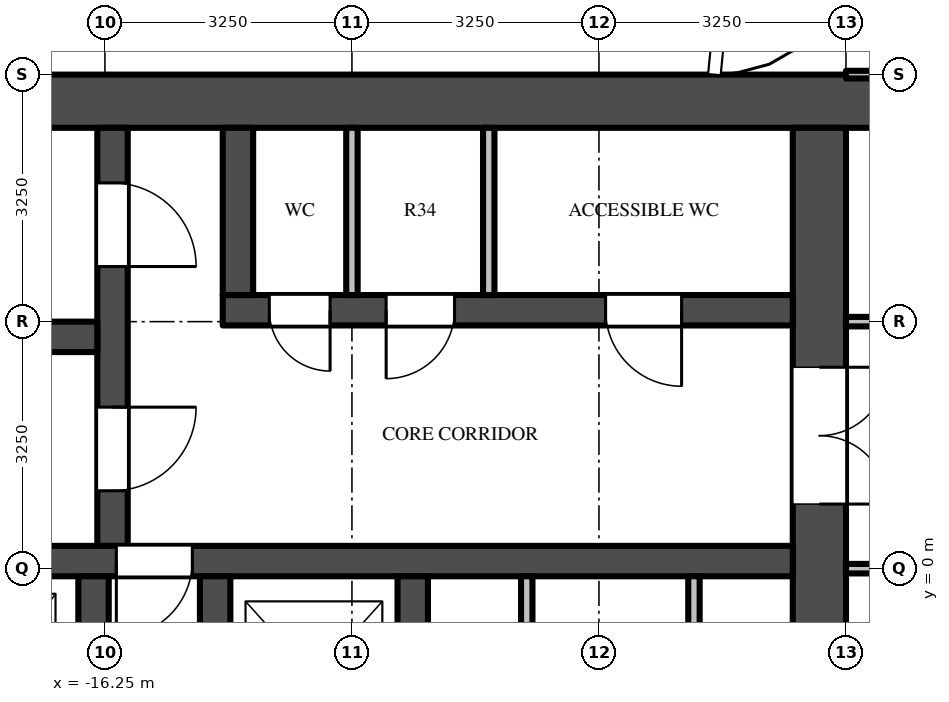
"""IFC4 building model, lengths in metres.
Left out: names, types, materials, properties, quantities, classifications, styles, units other than length and angle.
Written with IfcOpenShell. Run it as: python <this file> out.ifc"""

import sys

from ifc_helpers import new_model, si_unit, direction, frame, frame_2d, origin, place, context, subcontext, project, spatial, rectangle, extrude, source, transform, mapped, element, fill, save


model = new_model("IFC4")
c1 = context("Model", 3, precision=1e-05, world=origin(), true_north=direction((0.0, 1.0)))
c2 = subcontext(c1, "Body", "Model", "MODEL_VIEW")
j1 = project(units=[si_unit("LENGTHUNIT", "METRE"), si_unit("PLANEANGLEUNIT", "RADIAN")], contexts=[c1])
p1 = place(None, origin())
s1 = spatial("IfcSite", under=j1, at=p1, CompositionType="ELEMENT")
p2 = place(p1, origin())
s2 = spatial("IfcBuilding", under=s1, at=p2, CompositionType="ELEMENT")
p3 = place(p2, frame((0.0, 0.0, 298.9)))
s3 = spatial("IfcBuildingStorey", under=s2, at=p3, CompositionType="ELEMENT", Elevation=298.9)
m1 = source(origin(), c2, "Body", "SweptSolid", [
    extrude(rectangle(XDim=16.65, YDim=0.7, at=frame_2d((8.325, 0.0))), origin(), (0.0, 0.0, 1.0), 3.7),
])
p4 = place(p3, frame((-6.1, 6.15, 0.0), z_axis=(0.0, 0.0, 1.0), x_axis=(-1.0, 0.0, 0.0)))
e1 = element("IfcWall", 1, at=p4, inside=s3, PredefinedType="SHEAR", context=c2, shape_type="MappedRepresentation", body=[
    mapped(m1, transform((0.0, 0.0, 0.0))),
])
m2 = source(origin(), c2, "Body", "SweptSolid", [
    extrude(rectangle(XDim=9.05, YDim=0.7, at=frame_2d((4.525, 0.0))), origin(), (0.0, 0.0, 1.0), 3.7),
])
p5 = place(p3, frame((-6.85, 5.8, 0.0), z_axis=(0.0, 0.0, 1.0), x_axis=(0.0, -1.0, 0.0)))
e2 = element("IfcWall", 2, at=p5, inside=s3, PredefinedType="SHEAR", context=c2, shape_type="MappedRepresentation", body=[
    mapped(m2, transform((0.0, 0.0, 0.0))),
])
m3 = source(origin(), c2, "Body", "SweptSolid", [
    extrude(rectangle(XDim=1.8, YDim=2.1, at=frame_2d((0.9, 1.05))), frame((0.0, 0.36, 0.0), z_axis=(0.0, -1.0, 0.0), x_axis=(1.0, 0.0, 0.0)), (0.0, 0.0, 1.0), 0.72),
])
p6 = place(p5, frame((3.15, 0.0, 0.0)))
e3 = element("IfcOpeningElement", 3, at=p6, cuts=e2, PredefinedType="OPENING", context=c2, shape_type="MappedRepresentation", body=[
    mapped(m3, transform((0.0, 0.0, 0.0))),
])
m4 = source(origin(), c2, "Body", "SweptSolid", [
    extrude(rectangle(XDim=7.5, YDim=0.4, at=frame_2d((3.75, 0.0))), origin(), (0.0, 0.0, 1.0), 3.7),
])
p7 = place(p3, frame((-7.2, 3.4, 0.0), z_axis=(0.0, 0.0, 1.0), x_axis=(-1.0, 0.0, 0.0)))
e4 = element("IfcWall", 4, at=p7, inside=s3, PredefinedType="SHEAR", context=c2, shape_type="MappedRepresentation", body=[
    mapped(m4, transform((0.0, 0.0, 0.0))),
])
m5 = source(origin(), c2, "Body", "SweptSolid", [
    extrude(rectangle(XDim=1.0, YDim=2.1, at=frame_2d((0.5, 1.05))), frame((0.0, 0.21, 0.0), z_axis=(0.0, -1.0, 0.0), x_axis=(1.0, 0.0, 0.0)), (0.0, 0.0, 1.0), 0.42),
])
p8 = place(p7, frame((1.462, 0.0, 0.0)))
e5 = element("IfcOpeningElement", 5, at=p8, cuts=e4, PredefinedType="OPENING", context=c2, shape_type="MappedRepresentation", body=[
    mapped(m5, transform((0.0, 0.0, 0.0))),
])
m6 = source(origin(), c2, "Body", "SweptSolid", [
    extrude(rectangle(XDim=0.9, YDim=2.1, at=frame_2d((0.45, 1.05))), frame((0.0, 0.21, 0.0), z_axis=(0.0, -1.0, 0.0), x_axis=(1.0, 0.0, 0.0)), (0.0, 0.0, 1.0), 0.42),
])
p9 = place(p7, frame((4.45, 0.0, 0.0)))
e6 = element("IfcOpeningElement", 6, at=p9, cuts=e4, PredefinedType="OPENING", context=c2, shape_type="MappedRepresentation", body=[
    mapped(m6, transform((0.0, 0.0, 0.0))),
])
m7 = source(origin(), c2, "Body", "SweptSolid", [
    extrude(rectangle(XDim=0.8, YDim=2.1, at=frame_2d((0.4, 1.05))), frame((0.0, 0.21, 0.0), z_axis=(0.0, -1.0, 0.0), x_axis=(1.0, 0.0, 0.0)), (0.0, 0.0, 1.0), 0.42),
])
p10 = place(p7, frame((6.087, 0.0, 0.0)))
e7 = element("IfcOpeningElement", 7, at=p10, cuts=e4, PredefinedType="OPENING", context=c2, shape_type="MappedRepresentation", body=[
    mapped(m7, transform((0.0, 0.0, 0.0))),
])
m8 = source(origin(), c2, "Body", "SweptSolid", [
    extrude(rectangle(XDim=14.85, YDim=0.4, at=frame_2d((7.425, 0.0))), origin(), (0.0, 0.0, 1.0), 3.7),
])
p11 = place(p3, frame((-7.2, 0.1, 0.0), z_axis=(0.0, 0.0, 1.0), x_axis=(-1.0, 0.0, 0.0)))
e8 = element("IfcWall", 8, at=p11, inside=s3, PredefinedType="SHEAR", context=c2, shape_type="MappedRepresentation", body=[
    mapped(m8, transform((0.0, 0.0, 0.0))),
])
p12 = place(p11, frame((7.9, 0.0, 0.0)))
e9 = element("IfcOpeningElement", 9, at=p12, cuts=e8, PredefinedType="OPENING", context=c2, shape_type="MappedRepresentation", body=[
    mapped(m5, transform((0.0, 0.0, 0.0))),
])
m9 = source(origin(), c2, "Body", "SweptSolid", [
    extrude(rectangle(XDim=5.5, YDim=0.4, at=frame_2d((2.75, 0.0))), origin(), (0.0, 0.0, 1.0), 3.7),
])
p13 = place(p3, frame((-16.15, 5.8, 0.0), z_axis=(0.0, 0.0, 1.0), x_axis=(0.0, -1.0, 0.0)))
e10 = element("IfcWall", 10, at=p13, inside=s3, PredefinedType="SHEAR", context=c2, shape_type="MappedRepresentation", body=[
    mapped(m9, transform((0.0, 0.0, 0.0))),
])
m10 = source(origin(), c2, "Body", "SweptSolid", [
    extrude(rectangle(XDim=1.1, YDim=2.1, at=frame_2d((0.55, 1.05))), frame((0.0, 0.21, 0.0), z_axis=(0.0, -1.0, 0.0), x_axis=(1.0, 0.0, 0.0)), (0.0, 0.0, 1.0), 0.42),
])
p14 = place(p13, frame((0.725, 0.0, 0.0)))
e11 = element("IfcOpeningElement", 11, at=p14, cuts=e10, PredefinedType="OPENING", context=c2, shape_type="MappedRepresentation", body=[
    mapped(m10, transform((0.0, 0.0, 0.0))),
])
p15 = place(p13, frame((3.675, 0.0, 0.0)))
e12 = element("IfcOpeningElement", 12, at=p15, cuts=e10, PredefinedType="OPENING", context=c2, shape_type="MappedRepresentation", body=[
    mapped(m10, transform((0.0, 0.0, 0.0))),
])
m11 = source(origin(), c2, "Body", "SweptSolid", [
    extrude(rectangle(XDim=5.7, YDim=0.4, at=frame_2d((2.85, 0.0))), origin(), (0.0, 0.0, 1.0), 3.7),
])
p16 = place(p3, frame((-16.35, 3.05, 0.0), z_axis=(0.0, 0.0, 1.0), x_axis=(-1.0, 0.0, 0.0)))
e13 = element("IfcWall", 13, at=p16, inside=s3, PredefinedType="SHEAR", context=c2, shape_type="MappedRepresentation", body=[
    mapped(m11, transform((0.0, 0.0, 0.0))),
])
m12 = source(origin(), c2, "Body", "SweptSolid", [
    extrude(rectangle(XDim=2.2, YDim=0.4, at=frame_2d((1.1, 0.0))), origin(), (0.0, 0.0, 1.0), 3.7),
])
p17 = place(p3, frame((-14.5, 5.8, 0.0), z_axis=(0.0, 0.0, 1.0), x_axis=(0.0, -1.0, 0.0)))
e14 = element("IfcWall", 14, at=p17, inside=s3, PredefinedType="SHEAR", context=c2, shape_type="MappedRepresentation", body=[
    mapped(m12, transform((0.0, 0.0, 0.0))),
])
m13 = source(origin(), c2, "Body", "SweptSolid", [
    extrude(rectangle(XDim=2.45, YDim=0.4, at=frame_2d((1.225, 0.0))), origin(), (0.0, 0.0, 1.0), 3.7),
])
for number, where, z_axis, x_axis in (
    (15, (-12.2, -0.1, 0.0), (0.0, 0.0, 1.0), (0.0, -1.0, 0.0)),
    (16, (-14.8, -0.1, 0.0), (0.0, 0.0, 1.0), (0.0, -1.0, 0.0)),
    (17, (-16.4, -0.1, 0.0), (0.0, 0.0, 1.0), (0.0, -1.0, 0.0)),
):
    element("IfcWall", number, at=place(p3, frame(where, z_axis=z_axis, x_axis=x_axis)), inside=s3, PredefinedType="SHEAR", context=c2, shape_type="MappedRepresentation", body=[
        mapped(m13, transform((0.0, 0.0, 0.0))),
    ])
m14 = source(origin(), c2, "Body", "SweptSolid", [
    extrude(rectangle(XDim=2.2, YDim=0.15, at=frame_2d((1.1, 0.0))), origin(), (0.0, 0.0, 1.0), 3.7),
])
for number, where, z_axis, x_axis in (
    (18, (-11.2, 5.8, 0.0), (0.0, 0.0, 1.0), (0.0, -1.0, 0.0)),
    (19, (-13.0, 5.8, 0.0), (0.0, 0.0, 1.0), (0.0, -1.0, 0.0)),
):
    element("IfcWall", number, at=place(p3, frame(where, z_axis=z_axis, x_axis=x_axis)), inside=s3, PredefinedType="PARTITIONING", context=c2, shape_type="MappedRepresentation", body=[
        mapped(m14, transform((0.0, 0.0, 0.0))),
    ])
m15 = source(origin(), c2, "Body", "SweptSolid", [
    extrude(rectangle(XDim=2.45, YDim=0.15, at=frame_2d((1.225, 0.0))), origin(), (0.0, 0.0, 1.0), 3.7),
])
for number, where, z_axis, x_axis in (
    (20, (-8.5, -0.1, 0.0), (0.0, 0.0, 1.0), (0.0, -1.0, 0.0)),
    (21, (-10.7, -0.1, 0.0), (0.0, 0.0, 1.0), (0.0, -1.0, 0.0)),
):
    element("IfcWall", number, at=place(p3, frame(where, z_axis=z_axis, x_axis=x_axis)), inside=s3, PredefinedType="PARTITIONING", context=c2, shape_type="MappedRepresentation", body=[
        mapped(m15, transform((0.0, 0.0, 0.0))),
    ])
m16 = source(origin(), c2, "Body", "SweptSolid", [
    extrude(rectangle(XDim=5.363, YDim=0.125, at=frame_2d((2.681, 0.0))), origin(), (0.0, 0.0, 1.0), 2.997),
])
p18 = place(p3, frame((-1.137, 0.0, 0.0), z_axis=(0.0, 0.0, 1.0), x_axis=(-1.0, 0.0, 0.0)))
e22 = element("IfcWall", 22, at=p18, inside=s3, PredefinedType="PARTITIONING", context=c2, shape_type="MappedRepresentation", body=[
    mapped(m16, transform((0.0, 0.0, 0.0))),
])
m17 = source(origin(), c2, "Body", "SweptSolid", [
    extrude(rectangle(XDim=1.0, YDim=2.1, at=frame_2d((0.5, 1.05))), frame((0.0, 0.073, 0.0), z_axis=(0.0, -1.0, 0.0), x_axis=(1.0, 0.0, 0.0)), (0.0, 0.0, 1.0), 0.145),
])
p19 = place(p18, frame((4.012, 0.0, 0.0)))
e23 = element("IfcOpeningElement", 23, at=p19, cuts=e22, PredefinedType="OPENING", context=c2, shape_type="MappedRepresentation", body=[
    mapped(m17, transform((0.0, 0.0, 0.0))),
])
p20 = place(p3, frame((-6.5, 3.25, 0.0), z_axis=(0.0, 0.0, 1.0), x_axis=(1.0, 0.0, 0.0)))
e24 = element("IfcWall", 24, at=p20, inside=s3, PredefinedType="PARTITIONING", context=c2, shape_type="MappedRepresentation", body=[
    mapped(m16, transform((0.0, 0.0, 0.0))),
])
p21 = place(p20, frame((1.3, 0.0, 0.0)))
e25 = element("IfcOpeningElement", 25, at=p21, cuts=e24, PredefinedType="OPENING", context=c2, shape_type="MappedRepresentation", body=[
    mapped(m17, transform((0.0, 0.0, 0.0))),
])
m18 = source(origin(), c2, "Body", "SweptSolid", [
    extrude(rectangle(XDim=5.238, YDim=0.1, at=frame_2d((2.619, 0.0))), origin(), (0.0, 0.0, 1.0), 2.78),
])
p22 = place(p3, frame((-6.5, 6.5, 0.0), z_axis=(0.0, 0.0, 1.0), x_axis=(1.0, 0.0, 0.0)))
e26 = element("IfcWall", 26, at=p22, inside=s3, PredefinedType="PARTITIONING", context=c2, shape_type="MappedRepresentation", body=[
    mapped(m18, transform((0.0, 0.0, 0.0))),
])
m19 = source(origin(), c2, "Body", "SweptSolid", [
    extrude(rectangle(XDim=1.8, YDim=2.1, at=frame_2d((0.9, 1.05))), frame((0.0, -0.275, 0.0), z_axis=(0.0, -1.0, 0.0), x_axis=(1.0, 0.0, 0.0)), (0.0, 0.0, 1.0), 0.05),
])
p23 = place(p6, origin())
e27 = element("IfcDoor", 27, at=p23, inside=s3, OperationType="DOUBLE_DOOR_SINGLE_SWING", PredefinedType="DOOR", context=c2, shape_type="MappedRepresentation", body=[
    mapped(m19, transform((0.0, 0.0, 0.0))),
])
fill(e3, e27)
m20 = source(origin(), c2, "Body", "SweptSolid", [
    extrude(rectangle(XDim=1.1, YDim=2.1, at=frame_2d((0.55, 1.05))), frame((0.0, 0.025, 0.0), z_axis=(0.0, -1.0, 0.0), x_axis=(1.0, 0.0, 0.0)), (0.0, 0.0, 1.0), 0.05),
])
p24 = place(p14, origin())
e28 = element("IfcDoor", 28, at=p24, inside=s3, OperationType="SINGLE_SWING_RIGHT", PredefinedType="DOOR", context=c2, shape_type="MappedRepresentation", body=[
    mapped(m20, transform((0.0, 0.0, 0.0))),
])
fill(e11, e28)
p25 = place(p15, origin())
e29 = element("IfcDoor", 29, at=p25, inside=s3, OperationType="SINGLE_SWING_LEFT", PredefinedType="DOOR", context=c2, shape_type="MappedRepresentation", body=[
    mapped(m20, transform((0.0, 0.0, 0.0))),
])
fill(e12, e29)
m21 = source(origin(), c2, "Body", "SweptSolid", [
    extrude(rectangle(XDim=1.0, YDim=2.1, at=frame_2d((0.5, 1.05))), frame((0.0, 0.025, 0.0), z_axis=(0.0, -1.0, 0.0), x_axis=(1.0, 0.0, 0.0)), (0.0, 0.0, 1.0), 0.05),
])
p26 = place(p12, origin())
e30 = element("IfcDoor", 30, at=p26, inside=s3, OperationType="SINGLE_SWING_RIGHT", PredefinedType="DOOR", context=c2, shape_type="MappedRepresentation", body=[
    mapped(m21, transform((0.0, 0.0, 0.0))),
])
fill(e9, e30)
p27 = place(p8, origin())
e31 = element("IfcDoor", 31, at=p27, inside=s3, OperationType="SINGLE_SWING_LEFT", PredefinedType="DOOR", context=c2, shape_type="MappedRepresentation", body=[
    mapped(m21, transform((0.0, 0.0, 0.0))),
])
fill(e5, e31)
m22 = source(origin(), c2, "Body", "SweptSolid", [
    extrude(rectangle(XDim=0.9, YDim=2.1, at=frame_2d((0.45, 1.05))), frame((0.0, 0.025, 0.0), z_axis=(0.0, -1.0, 0.0), x_axis=(1.0, 0.0, 0.0)), (0.0, 0.0, 1.0), 0.05),
])
p28 = place(p9, origin())
e32 = element("IfcDoor", 32, at=p28, inside=s3, OperationType="SINGLE_SWING_RIGHT", PredefinedType="DOOR", context=c2, shape_type="MappedRepresentation", body=[
    mapped(m22, transform((0.0, 0.0, 0.0))),
])
fill(e6, e32)
m23 = source(origin(), c2, "Body", "SweptSolid", [
    extrude(rectangle(XDim=0.8, YDim=2.1, at=frame_2d((0.4, 1.05))), frame((0.0, 0.025, 0.0), z_axis=(0.0, -1.0, 0.0), x_axis=(1.0, 0.0, 0.0)), (0.0, 0.0, 1.0), 0.05),
])
p29 = place(p10, origin())
e33 = element("IfcDoor", 33, at=p29, inside=s3, OperationType="SINGLE_SWING_LEFT", PredefinedType="DOOR", context=c2, shape_type="MappedRepresentation", body=[
    mapped(m23, transform((0.0, 0.0, 0.0))),
])
fill(e7, e33)
save(model, sys.argv[1])
